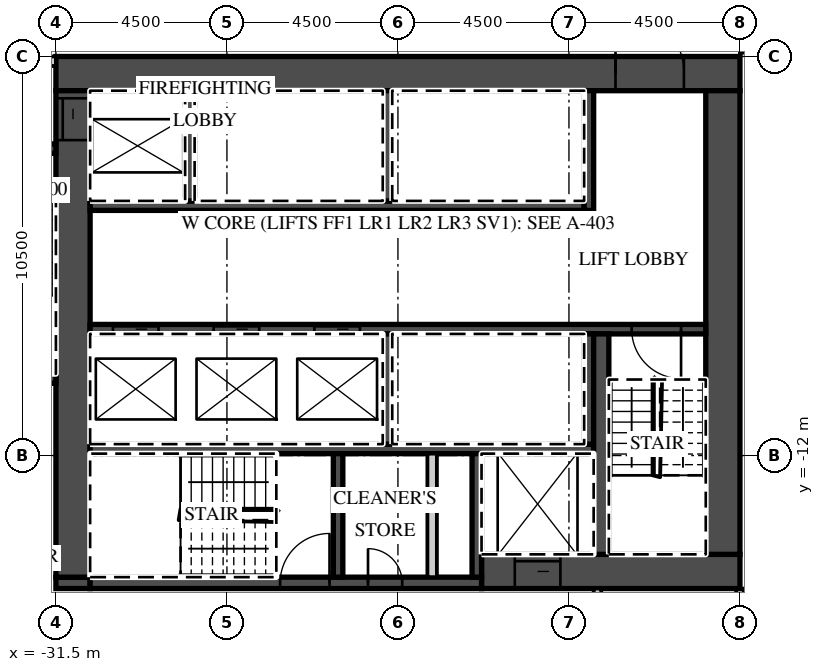
"""IFC4 building model, lengths in metres.
Left out: names, types, materials, properties, quantities, classifications, styles, units other than length and angle.
Written with IfcOpenShell. Run it as: python <this file> out.ifc"""

import sys

from ifc_helpers import new_model, si_unit, direction, frame, frame_2d, origin, place, context, subcontext, project, spatial, rectangle, extrude, element, fill, save


model = new_model("IFC4")
c1 = context("Model", 3, precision=1e-05, world=origin(), true_north=direction((0.0, 1.0)))
c2 = subcontext(c1, "Body", "Model", "MODEL_VIEW")
j1 = project(units=[si_unit("LENGTHUNIT", "METRE"), si_unit("PLANEANGLEUNIT", "RADIAN")], contexts=[c1])
p1 = place(None, origin())
s1 = spatial("IfcSite", under=j1, at=p1, CompositionType="ELEMENT")
p2 = place(p1, origin())
s2 = spatial("IfcBuilding", under=s1, at=p2, CompositionType="ELEMENT")
p3 = place(p2, frame((0.0, 0.0, 110.8)))
s3 = spatial("IfcBuildingStorey", under=s2, at=p3, CompositionType="ELEMENT", Elevation=110.8)
p4 = place(p3, frame((-13.5, -22.232, 0.0), z_axis=(0.0, 0.0, 1.0), x_axis=(0.0, 1.0, 0.0)))
e1 = element("IfcWall", 1, at=p4, inside=s3, PredefinedType="PARTITIONING", context=c2, shape_type="SweptSolid", body=[
    extrude(rectangle(XDim=6.732, YDim=0.2, at=frame_2d((3.366, 0.0))), origin(), (0.0, 0.0, 1.0), 3.02),
])
p5 = place(p3, frame((-13.5, -1.3, 0.0), z_axis=(0.0, 0.0, 1.0), x_axis=(1.0, 0.0, 0.0)))
e2 = element("IfcWall", 2, at=p5, inside=s3, PredefinedType="PARTITIONING", context=c2, shape_type="SweptSolid", body=[
    extrude(rectangle(XDim=60.932, YDim=0.2, at=frame_2d((30.466, 0.0))), origin(), (0.0, 0.0, 1.0), 3.02),
])
p6 = place(p5, frame((0.575, 0.0, 0.0)))
e3 = element("IfcOpeningElement", 3, at=p6, cuts=e2, PredefinedType="OPENING", context=c2, shape_type="SweptSolid", body=[
    extrude(rectangle(XDim=1.0, YDim=2.1, at=frame_2d((0.5, 1.05))), frame((0.0, 0.11, 0.0), z_axis=(0.0, -1.0, 0.0), x_axis=(1.0, 0.0, 0.0)), (0.0, 0.0, 1.0), 0.22),
])
p7 = place(p5, frame((5.075, 0.0, 0.0)))
e4 = element("IfcOpeningElement", 4, at=p7, cuts=e2, PredefinedType="OPENING", context=c2, shape_type="SweptSolid", body=[
    extrude(rectangle(XDim=1.0, YDim=2.1, at=frame_2d((0.5, 1.05))), frame((0.0, 0.11, 0.0), z_axis=(0.0, -1.0, 0.0), x_axis=(1.0, 0.0, 0.0)), (0.0, 0.0, 1.0), 0.22),
])
p8 = place(p5, frame((11.925, 0.0, 0.0)))
e5 = element("IfcOpeningElement", 5, at=p8, cuts=e2, PredefinedType="OPENING", context=c2, shape_type="SweptSolid", body=[
    extrude(rectangle(XDim=1.0, YDim=2.1, at=frame_2d((0.5, 1.05))), frame((0.0, 0.11, 0.0), z_axis=(0.0, -1.0, 0.0), x_axis=(1.0, 0.0, 0.0)), (0.0, 0.0, 1.0), 0.22),
])
p9 = place(p5, frame((15.938, 0.0, 0.0)))
e6 = element("IfcOpeningElement", 6, at=p9, cuts=e2, PredefinedType="OPENING", context=c2, shape_type="SweptSolid", body=[
    extrude(rectangle(XDim=1.2, YDim=2.1, at=frame_2d((0.6, 1.05))), frame((0.0, 0.11, 0.0), z_axis=(0.0, -1.0, 0.0), x_axis=(1.0, 0.0, 0.0)), (0.0, 0.0, 1.0), 0.22),
])
p10 = place(p5, frame((25.45, 0.0, 0.0)))
e7 = element("IfcOpeningElement", 7, at=p10, cuts=e2, PredefinedType="OPENING", context=c2, shape_type="SweptSolid", body=[
    extrude(rectangle(XDim=1.0, YDim=2.1, at=frame_2d((0.5, 1.05))), frame((0.0, 0.11, 0.0), z_axis=(0.0, -1.0, 0.0), x_axis=(1.0, 0.0, 0.0)), (0.0, 0.0, 1.0), 0.22),
])
p11 = place(p5, frame((27.55, 0.0, 0.0)))
e8 = element("IfcOpeningElement", 8, at=p11, cuts=e2, PredefinedType="OPENING", context=c2, shape_type="SweptSolid", body=[
    extrude(rectangle(XDim=1.0, YDim=2.1, at=frame_2d((0.5, 1.05))), frame((0.0, 0.11, 0.0), z_axis=(0.0, -1.0, 0.0), x_axis=(1.0, 0.0, 0.0)), (0.0, 0.0, 1.0), 0.22),
])
p12 = place(p5, frame((33.938, 0.0, 0.0)))
e9 = element("IfcOpeningElement", 9, at=p12, cuts=e2, PredefinedType="OPENING", context=c2, shape_type="SweptSolid", body=[
    extrude(rectangle(XDim=1.2, YDim=2.1, at=frame_2d((0.6, 1.05))), frame((0.0, 0.11, 0.0), z_axis=(0.0, -1.0, 0.0), x_axis=(1.0, 0.0, 0.0)), (0.0, 0.0, 1.0), 0.22),
])
p13 = place(p5, frame((45.862, 0.0, 0.0)))
e10 = element("IfcOpeningElement", 10, at=p13, cuts=e2, PredefinedType="OPENING", context=c2, shape_type="SweptSolid", body=[
    extrude(rectangle(XDim=1.2, YDim=2.1, at=frame_2d((0.6, 1.05))), frame((0.0, 0.11, 0.0), z_axis=(0.0, -1.0, 0.0), x_axis=(1.0, 0.0, 0.0)), (0.0, 0.0, 1.0), 0.22),
])
p14 = place(p5, frame((52.425, 0.0, 0.0)))
e11 = element("IfcOpeningElement", 11, at=p14, cuts=e2, PredefinedType="OPENING", context=c2, shape_type="SweptSolid", body=[
    extrude(rectangle(XDim=1.0, YDim=2.1, at=frame_2d((0.5, 1.05))), frame((0.0, 0.11, 0.0), z_axis=(0.0, -1.0, 0.0), x_axis=(1.0, 0.0, 0.0)), (0.0, 0.0, 1.0), 0.22),
])
p15 = place(p5, frame((56.95, 0.0, 0.0)))
e12 = element("IfcOpeningElement", 12, at=p15, cuts=e2, PredefinedType="OPENING", context=c2, shape_type="SweptSolid", body=[
    extrude(rectangle(XDim=1.0, YDim=2.1, at=frame_2d((0.5, 1.05))), frame((0.0, 0.11, 0.0), z_axis=(0.0, -1.0, 0.0), x_axis=(1.0, 0.0, 0.0)), (0.0, 0.0, 1.0), 0.22),
])
p16 = place(p5, frame((59.882, 0.0, 0.0)))
e13 = element("IfcOpeningElement", 13, at=p16, cuts=e2, PredefinedType="OPENING", context=c2, shape_type="SweptSolid", body=[
    extrude(rectangle(XDim=0.9, YDim=2.1, at=frame_2d((0.45, 1.05))), frame((0.0, 0.11, 0.0), z_axis=(0.0, -1.0, 0.0), x_axis=(1.0, 0.0, 0.0)), (0.0, 0.0, 1.0), 0.22),
])
p17 = place(p3, frame((-31.5, -1.95, 0.0), z_axis=(0.0, 0.0, 1.0), x_axis=(1.0, 0.0, 0.0)))
e14 = element("IfcWall", 14, at=p17, inside=s3, PredefinedType="SHEAR", context=c2, shape_type="SweptSolid", body=[
    extrude(rectangle(XDim=18.0, YDim=0.9, at=frame_2d((9.0, 0.0))), origin(), (0.0, 0.0, 1.0), 3.02),
])
p18 = place(p17, frame((14.725, 0.0, 0.0)))
e15 = element("IfcOpeningElement", 15, at=p18, cuts=e14, PredefinedType="OPENING", context=c2, shape_type="SweptSolid", body=[
    extrude(rectangle(XDim=1.8, YDim=2.1, at=frame_2d((0.9, 1.05))), frame((0.0, 0.46, 0.0), z_axis=(0.0, -1.0, 0.0), x_axis=(1.0, 0.0, 0.0)), (0.0, 0.0, 1.0), 0.92),
])
p19 = place(p3, frame((-20.3, -15.05, 0.0), z_axis=(0.0, 0.0, 1.0), x_axis=(1.0, 0.0, 0.0)))
e16 = element("IfcWall", 16, at=p19, inside=s3, PredefinedType="SHEAR", context=c2, shape_type="SweptSolid", body=[
    extrude(rectangle(XDim=6.8, YDim=0.9, at=frame_2d((3.4, 0.0))), origin(), (0.0, 0.0, 1.0), 3.02),
])
p20 = place(p19, frame((0.875, 0.0, 0.0)))
e17 = element("IfcOpeningElement", 17, at=p20, cuts=e16, PredefinedType="OPENING", context=c2, shape_type="SweptSolid", body=[
    extrude(rectangle(XDim=1.2, YDim=2.1, at=frame_2d((0.6, 1.05))), frame((0.0, 0.46, 0.0), z_axis=(0.0, -1.0, 0.0), x_axis=(1.0, 0.0, 0.0)), (0.0, 0.0, 1.0), 0.92),
])
p21 = place(p3, frame((-31.5, -15.35, 0.0), z_axis=(0.0, 0.0, 1.0), x_axis=(1.0, 0.0, 0.0)))
e18 = element("IfcWall", 18, at=p21, inside=s3, PredefinedType="SHEAR", context=c2, shape_type="SweptSolid", body=[
    extrude(rectangle(XDim=0.9, YDim=0.3, at=frame_2d((0.45, 0.0))), origin(), (0.0, 0.0, 1.0), 3.02),
])
p22 = place(p3, frame((-30.6, -15.35, 0.0), z_axis=(0.0, 0.0, 1.0), x_axis=(1.0, 0.0, 0.0)))
e19 = element("IfcWall", 19, at=p22, inside=s3, PredefinedType="SHEAR", context=c2, shape_type="SweptSolid", body=[
    extrude(rectangle(XDim=10.3, YDim=0.3, at=frame_2d((5.15, 0.0))), origin(), (0.0, 0.0, 1.0), 3.02),
])
p23 = place(p22, frame((5.0, 0.0, 0.0)))
e20 = element("IfcOpeningElement", 20, at=p23, cuts=e19, PredefinedType="OPENING", context=c2, shape_type="SweptSolid", body=[
    extrude(rectangle(XDim=1.3, YDim=2.1, at=frame_2d((0.65, 1.05))), frame((0.0, 0.16, 0.0), z_axis=(0.0, -1.0, 0.0), x_axis=(1.0, 0.0, 0.0)), (0.0, 0.0, 1.0), 0.32),
])
p24 = place(p22, frame((7.312, 0.0, 0.0)))
e21 = element("IfcOpeningElement", 21, at=p24, cuts=e19, PredefinedType="OPENING", context=c2, shape_type="SweptSolid", body=[
    extrude(rectangle(XDim=0.9, YDim=2.1, at=frame_2d((0.45, 1.05))), frame((0.0, 0.16, 0.0), z_axis=(0.0, -1.0, 0.0), x_axis=(1.0, 0.0, 0.0)), (0.0, 0.0, 1.0), 0.32),
])
p25 = place(p3, frame((-31.05, -15.2, 0.0), z_axis=(0.0, 0.0, 1.0), x_axis=(0.0, 1.0, 0.0)))
e22 = element("IfcWall", 22, at=p25, inside=s3, PredefinedType="SHEAR", context=c2, shape_type="SweptSolid", body=[
    extrude(rectangle(XDim=12.8, YDim=0.9, at=frame_2d((6.4, 0.0))), origin(), (0.0, 0.0, 1.0), 3.02),
])
p26 = place(p25, frame((11.5, 0.0, 0.0)))
e23 = element("IfcOpeningElement", 23, at=p26, cuts=e22, PredefinedType="OPENING", context=c2, shape_type="SweptSolid", body=[
    extrude(rectangle(XDim=1.1, YDim=2.1, at=frame_2d((0.55, 1.05))), frame((0.0, 0.46, 0.0), z_axis=(0.0, -1.0, 0.0), x_axis=(1.0, 0.0, 0.0)), (0.0, 0.0, 1.0), 0.92),
])
p27 = place(p3, frame((-13.95, -14.6, 0.0), z_axis=(0.0, 0.0, 1.0), x_axis=(0.0, 1.0, 0.0)))
e24 = element("IfcWall", 24, at=p27, inside=s3, PredefinedType="SHEAR", context=c2, shape_type="SweptSolid", body=[
    extrude(rectangle(XDim=12.2, YDim=0.9, at=frame_2d((6.1, 0.0))), origin(), (0.0, 0.0, 1.0), 3.02),
])
p28 = place(p3, frame((-30.6, -5.425, 0.0), z_axis=(0.0, 0.0, 1.0), x_axis=(1.0, 0.0, 0.0)))
e25 = element("IfcWall", 25, at=p28, inside=s3, PredefinedType="SHEAR", context=c2, shape_type="SweptSolid", body=[
    extrude(rectangle(XDim=13.0, YDim=0.25, at=frame_2d((6.5, 0.0))), origin(), (0.0, 0.0, 1.0), 3.02),
])
p29 = place(p3, frame((-17.475, -5.55, 0.0), z_axis=(0.0, 0.0, 1.0), x_axis=(0.0, 1.0, 0.0)))
e26 = element("IfcWall", 26, at=p29, inside=s3, PredefinedType="SHEAR", context=c2, shape_type="SweptSolid", body=[
    extrude(rectangle(XDim=3.15, YDim=0.25, at=frame_2d((1.575, 0.0))), origin(), (0.0, 0.0, 1.0), 3.02),
])
for number, where, z_axis, x_axis in (
    (27, (-27.975, -5.3, 0.0), (0.0, 0.0, 1.0), (0.0, 1.0, 0.0)),
    (28, (-22.775, -5.3, 0.0), (0.0, 0.0, 1.0), (0.0, 1.0, 0.0)),
):
    element("IfcWall", number, at=place(p3, frame(where, z_axis=z_axis, x_axis=x_axis)), inside=s3, PredefinedType="SHEAR", context=c2, shape_type="SweptSolid", body=[
        extrude(rectangle(XDim=2.9, YDim=0.25, at=frame_2d((1.45, 0.0))), origin(), (0.0, 0.0, 1.0), 3.02),
    ])
p30 = place(p3, frame((-30.6, -8.675, 0.0), z_axis=(0.0, 0.0, 1.0), x_axis=(1.0, 0.0, 0.0)))
e29 = element("IfcWall", 29, at=p30, inside=s3, PredefinedType="SHEAR", context=c2, shape_type="SweptSolid", body=[
    extrude(rectangle(XDim=16.2, YDim=0.25, at=frame_2d((8.1, 0.0))), origin(), (0.0, 0.0, 1.0), 3.02),
])
p31 = place(p30, frame((0.6, 0.0, 0.0)))
e30 = element("IfcOpeningElement", 30, at=p31, cuts=e29, PredefinedType="OPENING", context=c2, shape_type="SweptSolid", body=[
    extrude(rectangle(XDim=1.2, YDim=2.1, at=frame_2d((0.6, 1.05))), frame((0.0, 0.135, 0.0), z_axis=(0.0, -1.0, 0.0), x_axis=(1.0, 0.0, 0.0)), (0.0, 0.0, 1.0), 0.27),
])
p32 = place(p30, frame((3.25, 0.0, 0.0)))
e31 = element("IfcOpeningElement", 31, at=p32, cuts=e29, PredefinedType="OPENING", context=c2, shape_type="SweptSolid", body=[
    extrude(rectangle(XDim=1.2, YDim=2.1, at=frame_2d((0.6, 1.05))), frame((0.0, 0.135, 0.0), z_axis=(0.0, -1.0, 0.0), x_axis=(1.0, 0.0, 0.0)), (0.0, 0.0, 1.0), 0.27),
])
p33 = place(p30, frame((5.9, 0.0, 0.0)))
e32 = element("IfcOpeningElement", 32, at=p33, cuts=e29, PredefinedType="OPENING", context=c2, shape_type="SweptSolid", body=[
    extrude(rectangle(XDim=1.2, YDim=2.1, at=frame_2d((0.6, 1.05))), frame((0.0, 0.135, 0.0), z_axis=(0.0, -1.0, 0.0), x_axis=(1.0, 0.0, 0.0)), (0.0, 0.0, 1.0), 0.27),
])
p34 = place(p30, frame((14.25, 0.0, 0.0)))
e33 = element("IfcOpeningElement", 33, at=p34, cuts=e29, PredefinedType="OPENING", context=c2, shape_type="SweptSolid", body=[
    extrude(rectangle(XDim=1.3, YDim=2.1, at=frame_2d((0.65, 1.05))), frame((0.0, 0.135, 0.0), z_axis=(0.0, -1.0, 0.0), x_axis=(1.0, 0.0, 0.0)), (0.0, 0.0, 1.0), 0.27),
])
p35 = place(p3, frame((-30.6, -11.825, 0.0), z_axis=(0.0, 0.0, 1.0), x_axis=(1.0, 0.0, 0.0)))
e34 = element("IfcWall", 34, at=p35, inside=s3, PredefinedType="SHEAR", context=c2, shape_type="SweptSolid", body=[
    extrude(rectangle(XDim=13.25, YDim=0.25, at=frame_2d((6.625, 0.0))), origin(), (0.0, 0.0, 1.0), 3.02),
])
for number, where, z_axis, x_axis in (
    (35, (-17.475, -11.7, 0.0), (0.0, 0.0, 1.0), (0.0, 1.0, 0.0)),
    (36, (-22.775, -11.7, 0.0), (0.0, 0.0, 1.0), (0.0, 1.0, 0.0)),
):
    element("IfcWall", number, at=place(p3, frame(where, z_axis=z_axis, x_axis=x_axis)), inside=s3, PredefinedType="SHEAR", context=c2, shape_type="SweptSolid", body=[
        extrude(rectangle(XDim=2.9, YDim=0.25, at=frame_2d((1.45, 0.0))), origin(), (0.0, 0.0, 1.0), 3.02),
    ])
p36 = place(p3, frame((-17.15, -14.6, 0.0), z_axis=(0.0, 0.0, 1.0), x_axis=(0.0, 1.0, 0.0)))
e37 = element("IfcWall", 37, at=p36, inside=s3, PredefinedType="SHEAR", context=c2, shape_type="SweptSolid", body=[
    extrude(rectangle(XDim=5.8, YDim=0.4, at=frame_2d((2.9, 0.0))), origin(), (0.0, 0.0, 1.0), 3.02),
])
for number, where, z_axis, x_axis in (
    (38, (-20.425, -15.2, 0.0), (0.0, 0.0, 1.0), (0.0, 1.0, 0.0)),
    (39, (-24.075, -15.2, 0.0), (0.0, 0.0, 1.0), (0.0, 1.0, 0.0)),
):
    element("IfcWall", number, at=place(p3, frame(where, z_axis=z_axis, x_axis=x_axis)), inside=s3, PredefinedType="SHEAR", context=c2, shape_type="SweptSolid", body=[
        extrude(rectangle(XDim=3.25, YDim=0.25, at=frame_2d((1.625, 0.0))), origin(), (0.0, 0.0, 1.0), 3.02),
    ])
p37 = place(p3, frame((-21.6, -15.2, 0.0), z_axis=(0.0, 0.0, 1.0), x_axis=(0.0, 1.0, 0.0)))
e40 = element("IfcWall", 40, at=p37, inside=s3, PredefinedType="PARTITIONING", context=c2, shape_type="SweptSolid", body=[
    extrude(rectangle(XDim=3.25, YDim=0.25, at=frame_2d((1.625, 0.0))), origin(), (0.0, 0.0, 1.0), 3.02),
])
p38 = place(p3, frame((-39.035, -1.625, 0.0), z_axis=(0.0, 0.0, 1.0), x_axis=(1.0, 0.0, 0.0)))
e41 = element("IfcWall", 41, at=p38, inside=s3, PredefinedType="PARTITIONING", context=c2, shape_type="SweptSolid", body=[
    extrude(rectangle(XDim=7.535, YDim=0.25, at=frame_2d((3.768, 0.0))), origin(), (0.0, 0.0, 1.0), 3.02),
])
p39 = place(p38, frame((5.61, 0.0, 0.0)))
e42 = element("IfcOpeningElement", 42, at=p39, cuts=e41, PredefinedType="OPENING", context=c2, shape_type="SweptSolid", body=[
    extrude(rectangle(XDim=1.3, YDim=2.1, at=frame_2d((0.65, 1.05))), frame((0.0, 0.135, 0.0), z_axis=(0.0, -1.0, 0.0), x_axis=(1.0, 0.0, 0.0)), (0.0, 0.0, 1.0), 0.27),
])
p40 = place(p38, frame((3.185, 0.0, 0.0)))
e43 = element("IfcOpeningElement", 43, at=p40, cuts=e41, PredefinedType="OPENING", context=c2, shape_type="SweptSolid", body=[
    extrude(rectangle(XDim=1.1, YDim=2.1, at=frame_2d((0.55, 1.05))), frame((0.0, 0.135, 0.0), z_axis=(0.0, -1.0, 0.0), x_axis=(1.0, 0.0, 0.0)), (0.0, 0.0, 1.0), 0.27),
])
p41 = place(p3, frame((-34.05, -3.925, 0.0), z_axis=(0.0, 0.0, 1.0), x_axis=(1.0, 0.0, 0.0)))
e44 = element("IfcWall", 44, at=p41, inside=s3, PredefinedType="SHEAR", context=c2, shape_type="SweptSolid", body=[
    extrude(rectangle(XDim=2.55, YDim=0.25, at=frame_2d((1.275, 0.0))), origin(), (0.0, 0.0, 1.0), 3.02),
])
p42 = place(p41, frame((0.625, 0.0, 0.0)))
e45 = element("IfcOpeningElement", 45, at=p42, cuts=e44, PredefinedType="OPENING", context=c2, shape_type="SweptSolid", body=[
    extrude(rectangle(XDim=1.3, YDim=2.1, at=frame_2d((0.65, 1.05))), frame((0.0, 0.135, 0.0), z_axis=(0.0, -1.0, 0.0), x_axis=(1.0, 0.0, 0.0)), (0.0, 0.0, 1.0), 0.27),
])
p43 = place(p3, frame((-34.05, -9.975, 0.0), z_axis=(0.0, 0.0, 1.0), x_axis=(1.0, 0.0, 0.0)))
e46 = element("IfcWall", 46, at=p43, inside=s3, PredefinedType="SHEAR", context=c2, shape_type="SweptSolid", body=[
    extrude(rectangle(XDim=2.55, YDim=0.25, at=frame_2d((1.275, 0.0))), origin(), (0.0, 0.0, 1.0), 3.02),
])
p44 = place(p3, frame((-17.25, -17.7, 0.0), z_axis=(0.0, 0.0, 1.0), x_axis=(0.0, 1.0, 0.0)))
e47 = element("IfcWall", 47, at=p44, inside=s3, PredefinedType="PARTITIONING", context=c2, shape_type="SweptSolid", body=[
    extrude(rectangle(XDim=2.2, YDim=0.2, at=frame_2d((1.1, 0.0))), origin(), (0.0, 0.0, 1.0), 3.02),
])
p45 = place(p31, origin())
e48 = element("IfcDoor", 48, at=p45, inside=s3, OperationType="SLIDING_TO_LEFT", PredefinedType="DOOR", context=c2, shape_type="SweptSolid", body=[
    extrude(rectangle(XDim=1.2, YDim=2.1, at=frame_2d((0.6, 1.05))), frame((0.0, 0.025, 0.0), z_axis=(0.0, -1.0, 0.0), x_axis=(1.0, 0.0, 0.0)), (0.0, 0.0, 1.0), 0.05),
])
fill(e30, e48)
p46 = place(p32, origin())
e49 = element("IfcDoor", 49, at=p46, inside=s3, OperationType="SLIDING_TO_RIGHT", PredefinedType="DOOR", context=c2, shape_type="SweptSolid", body=[
    extrude(rectangle(XDim=1.2, YDim=2.1, at=frame_2d((0.6, 1.05))), frame((0.0, 0.025, 0.0), z_axis=(0.0, -1.0, 0.0), x_axis=(1.0, 0.0, 0.0)), (0.0, 0.0, 1.0), 0.05),
])
fill(e31, e49)
p47 = place(p33, origin())
e50 = element("IfcDoor", 50, at=p47, inside=s3, OperationType="SLIDING_TO_RIGHT", PredefinedType="DOOR", context=c2, shape_type="SweptSolid", body=[
    extrude(rectangle(XDim=1.2, YDim=2.1, at=frame_2d((0.6, 1.05))), frame((0.0, 0.025, 0.0), z_axis=(0.0, -1.0, 0.0), x_axis=(1.0, 0.0, 0.0)), (0.0, 0.0, 1.0), 0.05),
])
fill(e32, e50)
p48 = place(p20, origin())
e51 = element("IfcDoor", 51, at=p48, inside=s3, OperationType="SLIDING_TO_LEFT", PredefinedType="DOOR", context=c2, shape_type="SweptSolid", body=[
    extrude(rectangle(XDim=1.2, YDim=2.1, at=frame_2d((0.6, 1.05))), frame((0.0, 0.025, 0.0), z_axis=(0.0, -1.0, 0.0), x_axis=(1.0, 0.0, 0.0)), (0.0, 0.0, 1.0), 0.05),
])
fill(e17, e51)
p49 = place(p26, origin())
e52 = element("IfcDoor", 52, at=p49, inside=s3, OperationType="SLIDING_TO_RIGHT", PredefinedType="DOOR", context=c2, shape_type="SweptSolid", body=[
    extrude(rectangle(XDim=1.1, YDim=2.1, at=frame_2d((0.55, 1.05))), frame((0.0, 0.025, 0.0), z_axis=(0.0, -1.0, 0.0), x_axis=(1.0, 0.0, 0.0)), (0.0, 0.0, 1.0), 0.05),
])
fill(e23, e52)
p50 = place(p18, origin())
e53 = element("IfcDoor", 53, at=p50, inside=s3, OperationType="DOUBLE_DOOR_DOUBLE_SWING", PredefinedType="DOOR", context=c2, shape_type="SweptSolid", body=[
    extrude(rectangle(XDim=1.8, YDim=2.1, at=frame_2d((0.9, 1.05))), frame((0.0, 0.025, 0.0), z_axis=(0.0, -1.0, 0.0), x_axis=(1.0, 0.0, 0.0)), (0.0, 0.0, 1.0), 0.05),
])
fill(e15, e53)
p51 = place(p34, origin())
e54 = element("IfcDoor", 54, at=p51, inside=s3, OperationType="SINGLE_SWING_RIGHT", PredefinedType="DOOR", context=c2, shape_type="SweptSolid", body=[
    extrude(rectangle(XDim=1.3, YDim=2.1, at=frame_2d((0.65, 1.05))), frame((0.0, 0.025, 0.0), z_axis=(0.0, -1.0, 0.0), x_axis=(1.0, 0.0, 0.0)), (0.0, 0.0, 1.0), 0.05),
])
fill(e33, e54)
p52 = place(p23, origin())
e55 = element("IfcDoor", 55, at=p52, inside=s3, OperationType="SINGLE_SWING_RIGHT", PredefinedType="DOOR", context=c2, shape_type="SweptSolid", body=[
    extrude(rectangle(XDim=1.3, YDim=2.1, at=frame_2d((0.65, 1.05))), frame((0.0, 0.025, 0.0), z_axis=(0.0, -1.0, 0.0), x_axis=(1.0, 0.0, 0.0)), (0.0, 0.0, 1.0), 0.05),
])
fill(e20, e55)
p53 = place(p24, origin())
e56 = element("IfcDoor", 56, at=p53, inside=s3, OperationType="SINGLE_SWING_LEFT", PredefinedType="DOOR", context=c2, shape_type="SweptSolid", body=[
    extrude(rectangle(XDim=0.9, YDim=2.1, at=frame_2d((0.45, 1.05))), frame((0.0, 0.025, 0.0), z_axis=(0.0, -1.0, 0.0), x_axis=(1.0, 0.0, 0.0)), (0.0, 0.0, 1.0), 0.05),
])
fill(e21, e56)
save(model, sys.argv[1])
